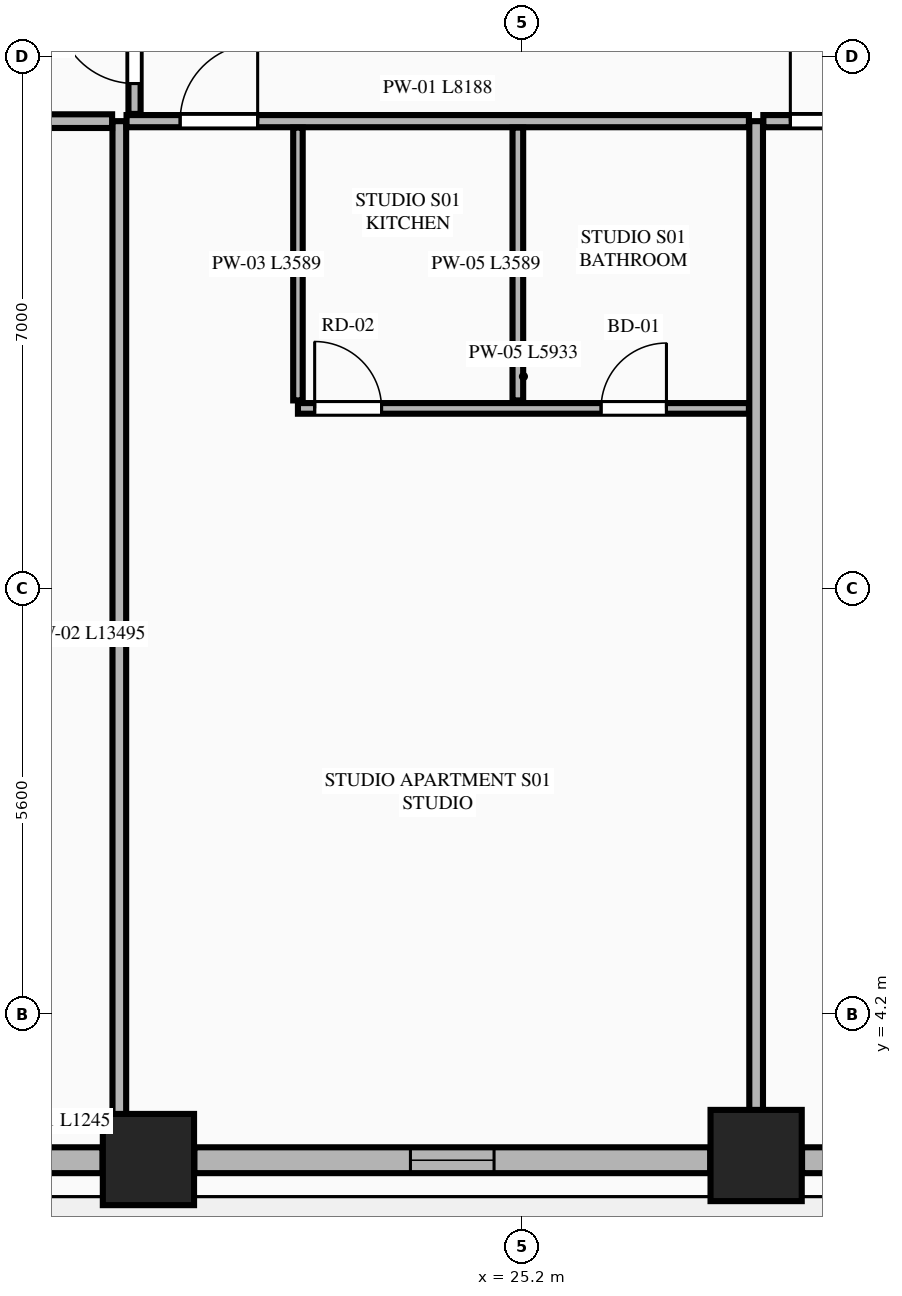
"""IFC4 building model, lengths in metres.
Left out: names, types, materials, properties, quantities, classifications, styles, units other than length and angle.
Written with IfcOpenShell. Run it as: python <this file> out.ifc"""

import sys

from ifc_helpers import new_model, si_unit, direction, frame, frame_2d, origin, origin_2d, place, context, subcontext, project, spatial, rectangle, extrude, element, fill, save


model = new_model("IFC4")
c1 = context("Model", 3, precision=1e-05, world=origin(), true_north=direction((0.0, 1.0)))
c2 = subcontext(c1, "Body", "Model", "MODEL_VIEW")
j1 = project(units=[si_unit("LENGTHUNIT", "METRE"), si_unit("PLANEANGLEUNIT", "RADIAN")], contexts=[c1])
p1 = place(None, origin())
s1 = spatial("IfcSite", under=j1, at=p1, CompositionType="ELEMENT")
p2 = place(p1, origin())
s2 = spatial("IfcBuilding", under=s1, at=p2, CompositionType="ELEMENT")
p3 = place(p2, frame((0.0, 0.0, 63.95)))
s3 = spatial("IfcBuildingStorey", under=s2, at=p3, CompositionType="ELEMENT", Elevation=63.95)
for number, where, z_axis, x_axis in (
    (1, (20.283, 2.289, 0.0), (0.0, 0.0, 1.0), (1.0, 0.0, 0.0)),
    (2, (28.278, 2.342, 0.0), (0.0, 0.0, 1.0), (1.0, 0.0, 0.0)),
):
    element("IfcColumn", number, at=place(p3, frame(where, z_axis=z_axis, x_axis=x_axis)), inside=s3, PredefinedType="COLUMN", context=c2, shape_type="SweptSolid", body=[
        extrude(rectangle(XDim=1.2, YDim=1.2, at=origin_2d()), origin(), (0.0, 0.0, 1.0), 3.55),
    ])
p4 = place(p3, frame((18.434, 2.28, 0.0), z_axis=(0.0, 0.0, 1.0), x_axis=(1.0, 0.0, 0.0)))
e3 = element("IfcWall", 3, at=p4, inside=s3, PredefinedType="STANDARD", context=c2, shape_type="SweptSolid", body=[
    extrude(rectangle(XDim=1.245, YDim=0.34, at=frame_2d((0.623, 0.0))), origin(), (0.0, 0.0, 1.0), 3.33),
])
p5 = place(p3, frame((20.887, 2.28, 0.0), z_axis=(0.0, 0.0, 1.0), x_axis=(1.0, 0.0, 0.0)))
e4 = element("IfcWall", 4, at=p5, inside=s3, PredefinedType="STANDARD", context=c2, shape_type="SweptSolid", body=[
    extrude(rectangle(XDim=6.787, YDim=0.34, at=frame_2d((3.394, 0.0))), origin(), (0.0, 0.0, 1.0), 2.787),
])
p6 = place(p5, frame((2.843, 0.0, 0.75)))
e5 = element("IfcOpeningElement", 5, at=p6, cuts=e4, PredefinedType="OPENING", context=c2, shape_type="SweptSolid", body=[
    extrude(rectangle(XDim=1.1, YDim=1.887, at=frame_2d((0.55, 0.943))), frame((0.0, 0.18, 0.0), z_axis=(0.0, -1.0, 0.0), x_axis=(1.0, 0.0, 0.0)), (0.0, 0.0, 1.0), 0.36),
])
p7 = place(p3, frame((28.882, 2.28, 0.0), z_axis=(0.0, 0.0, 1.0), x_axis=(1.0, 0.0, 0.0)))
e6 = element("IfcWall", 6, at=p7, inside=s3, PredefinedType="STANDARD", context=c2, shape_type="SweptSolid", body=[
    extrude(rectangle(XDim=7.036, YDim=0.34, at=frame_2d((3.518, 0.0))), origin(), (0.0, 0.0, 1.0), 2.787),
])
p8 = place(p7, frame((2.968, 0.0, 0.0)))
e7 = element("IfcOpeningElement", 7, at=p8, cuts=e6, PredefinedType="OPENING", context=c2, shape_type="SweptSolid", body=[
    extrude(rectangle(XDim=1.1, YDim=2.25, at=frame_2d((0.55, 1.125))), frame((0.0, 0.18, 0.0), z_axis=(0.0, -1.0, 0.0), x_axis=(1.0, 0.0, 0.0)), (0.0, 0.0, 1.0), 0.36),
])
p9 = place(p3, frame((19.9, 2.455, 0.0), z_axis=(0.0, 0.0, 1.0), x_axis=(0.0, 1.0, 0.0)))
e8 = element("IfcWall", 8, at=p9, inside=s3, PredefinedType="PARTITIONING", context=c2, shape_type="SweptSolid", body=[
    extrude(rectangle(XDim=13.495, YDim=0.18, at=frame_2d((6.748, 0.0))), origin(), (0.0, 0.0, 1.0), 3.33),
])
p10 = place(p3, frame((28.278, 2.455, 0.0), z_axis=(0.0, 0.0, 1.0), x_axis=(0.0, 1.0, 0.0)))
e9 = element("IfcWall", 9, at=p10, inside=s3, PredefinedType="PARTITIONING", context=c2, shape_type="SweptSolid", body=[
    extrude(rectangle(XDim=13.495, YDim=0.18, at=frame_2d((6.748, 0.0))), origin(), (0.0, 0.0, 1.0), 2.7),
])
p11 = place(p3, frame((19.995, 15.95, 0.0), z_axis=(0.0, 0.0, 1.0), x_axis=(1.0, 0.0, 0.0)))
e10 = element("IfcWall", 10, at=p11, inside=s3, PredefinedType="PARTITIONING", context=c2, shape_type="SweptSolid", body=[
    extrude(rectangle(XDim=8.188, YDim=0.16, at=frame_2d((4.094, 0.0))), origin(), (0.0, 0.0, 1.0), 3.33),
])
p12 = place(p11, frame((0.705, 0.0, 0.0)))
e11 = element("IfcOpeningElement", 11, at=p12, cuts=e10, PredefinedType="OPENING", context=c2, shape_type="SweptSolid", body=[
    extrude(rectangle(XDim=1.02, YDim=2.25, at=frame_2d((0.51, 1.125))), frame((0.0, 0.09, 0.0), z_axis=(0.0, -1.0, 0.0), x_axis=(1.0, 0.0, 0.0)), (0.0, 0.0, 1.0), 0.18),
])
p13 = place(p3, frame((22.25, 12.276, 0.0), z_axis=(0.0, 0.0, 1.0), x_axis=(0.0, 1.0, 0.0)))
e12 = element("IfcWall", 12, at=p13, inside=s3, PredefinedType="PARTITIONING", context=c2, shape_type="SweptSolid", body=[
    extrude(rectangle(XDim=3.589, YDim=0.125, at=frame_2d((1.794, 0.0))), origin(), (0.0, 0.0, 1.0), 2.7),
])
p14 = place(p3, frame((22.25, 12.171, 0.0), z_axis=(0.0, 0.0, 1.0), x_axis=(1.0, 0.0, 0.0)))
e13 = element("IfcWall", 13, at=p14, inside=s3, PredefinedType="PLUMBINGWALL", context=c2, shape_type="SweptSolid", body=[
    extrude(rectangle(XDim=5.933, YDim=0.14, at=frame_2d((2.967, 0.0))), origin(), (0.0, 0.0, 1.0), 3.33),
])
p15 = place(p14, frame((3.988, 0.0, 0.0)))
e14 = element("IfcOpeningElement", 14, at=p15, cuts=e13, PredefinedType="OPENING", context=c2, shape_type="SweptSolid", body=[
    extrude(rectangle(XDim=0.86, YDim=2.1, at=frame_2d((0.43, 1.05))), frame((0.0, 0.08, 0.0), z_axis=(0.0, -1.0, 0.0), x_axis=(1.0, 0.0, 0.0)), (0.0, 0.0, 1.0), 0.16),
])
p16 = place(p14, frame((0.22, 0.0, 0.0)))
e15 = element("IfcOpeningElement", 15, at=p16, cuts=e13, PredefinedType="OPENING", context=c2, shape_type="SweptSolid", body=[
    extrude(rectangle(XDim=0.88, YDim=2.15, at=frame_2d((0.44, 1.075))), frame((0.0, 0.08, 0.0), z_axis=(0.0, -1.0, 0.0), x_axis=(1.0, 0.0, 0.0)), (0.0, 0.0, 1.0), 0.16),
])
p17 = place(p3, frame((25.143, 12.276, 0.0), z_axis=(0.0, 0.0, 1.0), x_axis=(0.0, 1.0, 0.0)))
e16 = element("IfcWall", 16, at=p17, inside=s3, PredefinedType="PLUMBINGWALL", context=c2, shape_type="SweptSolid", body=[
    extrude(rectangle(XDim=3.589, YDim=0.14, at=frame_2d((1.794, 0.0))), origin(), (0.0, 0.0, 1.0), 3.33),
])
p18 = place(p3, frame((28.373, 15.95, 0.0), z_axis=(0.0, 0.0, 1.0), x_axis=(1.0, 0.0, 0.0)))
e17 = element("IfcWall", 17, at=p18, inside=s3, PredefinedType="PARTITIONING", context=c2, shape_type="SweptSolid", body=[
    extrude(rectangle(XDim=8.054, YDim=0.16, at=frame_2d((4.027, 0.0))), origin(), (0.0, 0.0, 1.0), 3.33),
])
p19 = place(p18, frame((0.355, 0.0, 0.0)))
e18 = element("IfcOpeningElement", 18, at=p19, cuts=e17, PredefinedType="OPENING", context=c2, shape_type="SweptSolid", body=[
    extrude(rectangle(XDim=1.02, YDim=2.25, at=frame_2d((0.51, 1.125))), frame((0.0, 0.09, 0.0), z_axis=(0.0, -1.0, 0.0), x_axis=(1.0, 0.0, 0.0)), (0.0, 0.0, 1.0), 0.18),
])
p20 = place(p3, frame((10.564, 15.95, 0.0), z_axis=(0.0, 0.0, 1.0), x_axis=(1.0, 0.0, 0.0)))
e19 = element("IfcWall", 19, at=p20, inside=s3, PredefinedType="PARTITIONING", context=c2, shape_type="SweptSolid", body=[
    extrude(rectangle(XDim=9.241, YDim=0.18, at=frame_2d((4.621, 0.0))), origin(), (0.0, 0.0, 1.0), 3.33),
])
p21 = place(p3, frame((20.1, 16.045, 0.0), z_axis=(0.0, 0.0, 1.0), x_axis=(0.0, 1.0, 0.0)))
e20 = element("IfcWall", 20, at=p21, inside=s3, PredefinedType="PARTITIONING", context=c2, shape_type="SweptSolid", body=[
    extrude(rectangle(XDim=19.71, YDim=0.16, at=frame_2d((9.855, 0.0))), origin(), (0.0, 0.0, 1.0), 2.7),
])
p22 = place(p21, frame((0.4, 0.0, 0.0)))
e21 = element("IfcOpeningElement", 21, at=p22, cuts=e20, PredefinedType="OPENING", context=c2, shape_type="SweptSolid", body=[
    extrude(rectangle(XDim=1.02, YDim=2.25, at=frame_2d((0.51, 1.125))), frame((0.0, 0.09, 0.0), z_axis=(0.0, -1.0, 0.0), x_axis=(1.0, 0.0, 0.0)), (0.0, 0.0, 1.0), 0.18),
])
p23 = place(p6, origin())
e22 = element("IfcWindow", 22, at=p23, inside=s3, PartitioningType="SINGLE_PANEL", PredefinedType="WINDOW", context=c2, shape_type="SweptSolid", body=[
    extrude(rectangle(XDim=1.1, YDim=1.887, at=frame_2d((0.55, 0.943))), frame((0.0, 0.03, 0.0), z_axis=(0.0, -1.0, 0.0), x_axis=(1.0, 0.0, 0.0)), (0.0, 0.0, 1.0), 0.06),
])
fill(e5, e22)
p24 = place(p15, origin())
e23 = element("IfcDoor", 23, at=p24, inside=s3, OperationType="SINGLE_SWING_RIGHT", PredefinedType="DOOR", context=c2, shape_type="SweptSolid", body=[
    extrude(rectangle(XDim=0.86, YDim=2.1, at=frame_2d((0.43, 1.05))), frame((0.0, 0.025, 0.0), z_axis=(0.0, -1.0, 0.0), x_axis=(1.0, 0.0, 0.0)), (0.0, 0.0, 1.0), 0.05),
])
fill(e14, e23)
p25 = place(p12, origin())
e24 = element("IfcDoor", 24, at=p25, inside=s3, OperationType="SINGLE_SWING_RIGHT", PredefinedType="DOOR", context=c2, shape_type="SweptSolid", body=[
    extrude(rectangle(XDim=1.02, YDim=2.25, at=frame_2d((0.51, 1.125))), frame((0.0, 0.025, 0.0), z_axis=(0.0, -1.0, 0.0), x_axis=(1.0, 0.0, 0.0)), (0.0, 0.0, 1.0), 0.05),
])
fill(e11, e24)
p26 = place(p16, origin())
e25 = element("IfcDoor", 25, at=p26, inside=s3, OperationType="SINGLE_SWING_LEFT", PredefinedType="DOOR", context=c2, shape_type="SweptSolid", body=[
    extrude(rectangle(XDim=0.88, YDim=2.15, at=frame_2d((0.44, 1.075))), frame((0.0, 0.025, 0.0), z_axis=(0.0, -1.0, 0.0), x_axis=(1.0, 0.0, 0.0)), (0.0, 0.0, 1.0), 0.05),
])
fill(e15, e25)
p27 = place(p19, origin())
e26 = element("IfcDoor", 26, at=p27, inside=s3, OperationType="SINGLE_SWING_LEFT", PredefinedType="DOOR", context=c2, shape_type="SweptSolid", body=[
    extrude(rectangle(XDim=1.02, YDim=2.25, at=frame_2d((0.51, 1.125))), frame((0.0, 0.025, 0.0), z_axis=(0.0, -1.0, 0.0), x_axis=(1.0, 0.0, 0.0)), (0.0, 0.0, 1.0), 0.05),
])
fill(e18, e26)
p28 = place(p22, origin())
e27 = element("IfcDoor", 27, at=p28, inside=s3, OperationType="SINGLE_SWING_RIGHT", PredefinedType="DOOR", context=c2, shape_type="SweptSolid", body=[
    extrude(rectangle(XDim=1.02, YDim=2.25, at=frame_2d((0.51, 1.125))), frame((0.0, 0.025, 0.0), z_axis=(0.0, -1.0, 0.0), x_axis=(1.0, 0.0, 0.0)), (0.0, 0.0, 1.0), 0.05),
])
fill(e21, e27)
save(model, sys.argv[1])
